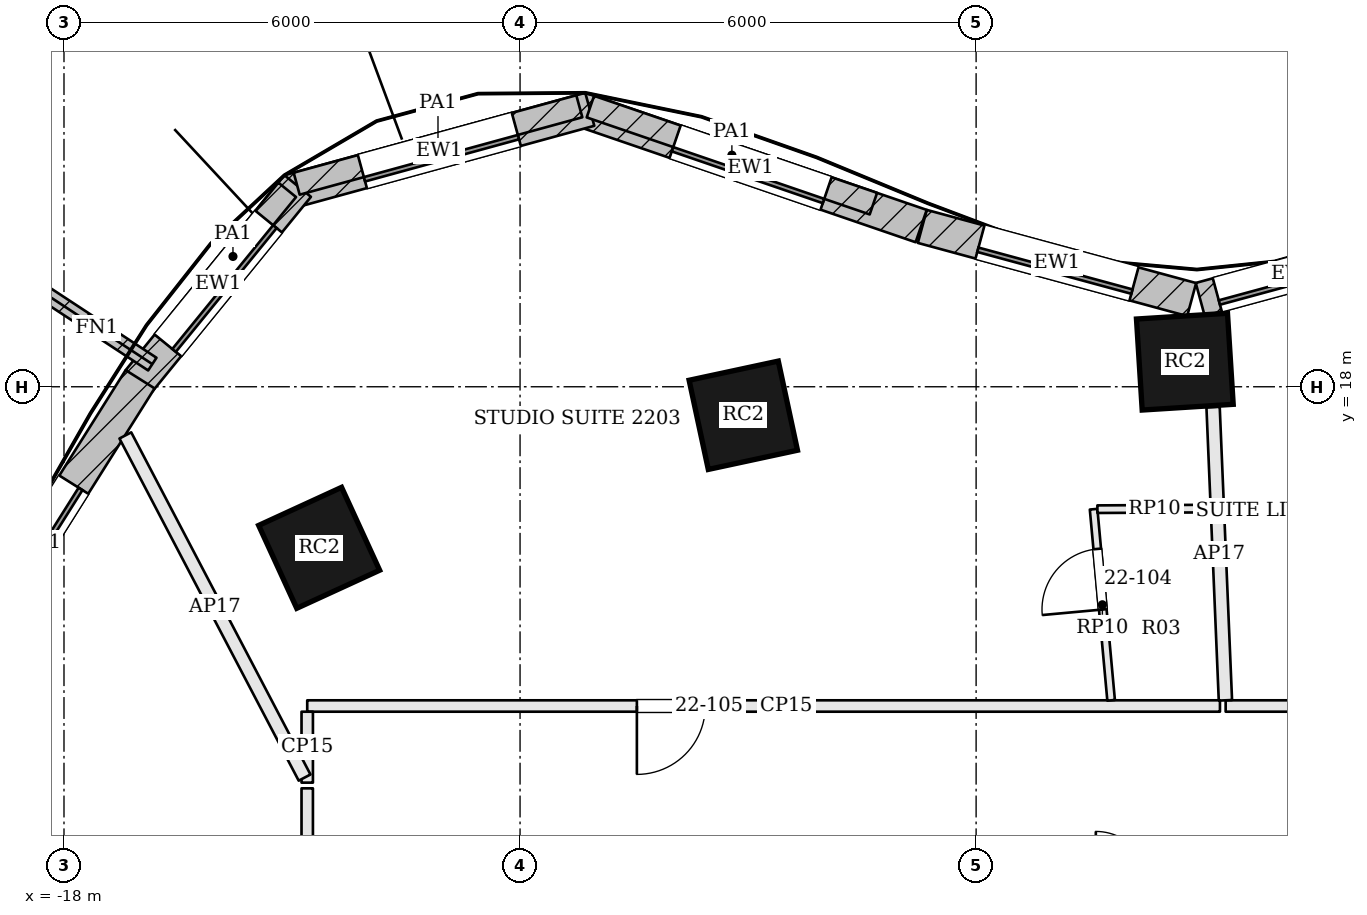
"""IFC4 building model, lengths in metres.
Left out: names, types, materials, properties, quantities, classifications, styles, units other than length and angle.
Written with IfcOpenShell. Run it as: python <this file> out.ifc"""

import sys

from ifc_helpers import new_model, si_unit, direction, frame, frame_2d, origin, origin_2d, place, context, subcontext, project, spatial, rectangle, extrude, element, fill, save


model = new_model("IFC4")
c1 = context("Model", 3, precision=1e-05, world=origin(), true_north=direction((0.0, 1.0)))
c2 = subcontext(c1, "Body", "Model", "MODEL_VIEW")
j1 = project(units=[si_unit("LENGTHUNIT", "METRE"), si_unit("PLANEANGLEUNIT", "RADIAN")], contexts=[c1])
p1 = place(None, origin())
s1 = spatial("IfcSite", under=j1, at=p1, CompositionType="ELEMENT")
p2 = place(p1, origin())
s2 = spatial("IfcBuilding", under=s1, at=p2, CompositionType="ELEMENT")
p3 = place(p2, frame((0.0, 0.0, 96.0)))
s3 = spatial("IfcBuildingStorey", under=s2, at=p3, CompositionType="ELEMENT", Elevation=96.0)
for number, where, z_axis, x_axis in (
    (1, (-3.254, 18.33, 0.0), (0.0, 0.0, 1.0), (-0.998, -0.063, 0.0)),
    (2, (-9.063, 17.625, 0.0), (0.0, 0.0, 1.0), (-0.978, -0.21, 0.0)),
    (3, (-14.643, 15.881, 0.0), (0.0, 0.0, 1.0), (-0.909, -0.417, 0.0)),
):
    element("IfcColumn", number, at=place(p3, frame(where, z_axis=z_axis, x_axis=x_axis)), inside=s3, PredefinedType="COLUMN", context=c2, shape_type="SweptSolid", body=[
        extrude(rectangle(XDim=1.2, YDim=1.2, at=origin_2d()), origin(), (0.0, 0.0, 1.0), 3.6),
    ])
p4 = place(p3, frame((-0.576, 19.821, 0.0), z_axis=(0.0, 0.0, 1.0), x_axis=(-0.965009398019, -0.262215296532, 0.0)))
e4 = element("IfcWall", 4, at=p4, inside=s3, PredefinedType="SOLIDWALL", context=c2, shape_type="SweptSolid", body=[
    extrude(rectangle(XDim=2.565, YDim=0.45, at=frame_2d((1.283, 0.0))), origin(), (0.0, 0.0, 1.0), 3.4),
])
p5 = place(p4, frame((0.233, 0.0, 0.9)))
e5 = element("IfcOpeningElement", 5, at=p5, cuts=e4, PredefinedType="OPENING", context=c2, shape_type="SweptSolid", body=[
    extrude(rectangle(XDim=2.1, YDim=2.0, at=frame_2d((1.05, 1.0))), frame((0.0, 0.235, 0.0), z_axis=(0.0, -1.0, 0.0), x_axis=(1.0, 0.0, 0.0)), (0.0, 0.0, 1.0), 0.47),
])
p6 = place(p3, frame((-3.164, 19.147, 0.0), z_axis=(0.0, 0.0, 1.0), x_axis=(-0.965039479998, 0.262104563191, 0.0)))
e6 = element("IfcWall", 6, at=p6, inside=s3, PredefinedType="SOLIDWALL", context=c2, shape_type="SweptSolid", body=[
    extrude(rectangle(XDim=3.672, YDim=0.45, at=frame_2d((1.836, 0.0))), origin(), (0.0, 0.0, 1.0), 3.4),
])
p7 = place(p6, frame((0.786, 0.0, 0.9)))
e7 = element("IfcOpeningElement", 7, at=p7, cuts=e6, PredefinedType="OPENING", context=c2, shape_type="SweptSolid", body=[
    extrude(rectangle(XDim=2.1, YDim=2.0, at=frame_2d((1.05, 1.0))), frame((0.0, 0.235, 0.0), z_axis=(0.0, -1.0, 0.0), x_axis=(1.0, 0.0, 0.0)), (0.0, 0.0, 1.0), 0.47),
])
p8 = place(p3, frame((-6.723, 20.114, 0.0), z_axis=(0.0, 0.0, 1.0), x_axis=(-0.945947299026, 0.324320377815, 0.0)))
e8 = element("IfcWall", 8, at=p8, inside=s3, PredefinedType="SOLIDWALL", context=c2, shape_type="SweptSolid", body=[
    extrude(rectangle(XDim=4.745, YDim=0.45, at=frame_2d((2.372, 0.0))), origin(), (0.0, 0.0, 1.0), 3.4),
])
p9 = place(p8, frame((1.322, 0.0, 0.9)))
e9 = element("IfcOpeningElement", 9, at=p9, cuts=e8, PredefinedType="OPENING", context=c2, shape_type="SweptSolid", body=[
    extrude(rectangle(XDim=2.1, YDim=2.0, at=frame_2d((1.05, 1.0))), frame((0.0, 0.235, 0.0), z_axis=(0.0, -1.0, 0.0), x_axis=(1.0, 0.0, 0.0)), (0.0, 0.0, 1.0), 0.47),
])
p10 = place(p3, frame((-11.083, 21.65, 0.0), z_axis=(0.0, 0.0, 1.0), x_axis=(-0.964483204983, -0.264144179011, 0.0)))
e10 = element("IfcWall", 10, at=p10, inside=s3, PredefinedType="SOLIDWALL", context=c2, shape_type="SweptSolid", body=[
    extrude(rectangle(XDim=4.104, YDim=0.45, at=frame_2d((2.052, 0.0))), origin(), (0.0, 0.0, 1.0), 3.4),
])
p11 = place(p10, frame((1.002, 0.0, 0.9)))
e11 = element("IfcOpeningElement", 11, at=p11, cuts=e10, PredefinedType="OPENING", context=c2, shape_type="SweptSolid", body=[
    extrude(rectangle(XDim=2.1, YDim=2.0, at=frame_2d((1.05, 1.0))), frame((0.0, 0.235, 0.0), z_axis=(0.0, -1.0, 0.0), x_axis=(1.0, 0.0, 0.0)), (0.0, 0.0, 1.0), 0.47),
])
p12 = place(p3, frame((-14.926, 20.641, 0.0), z_axis=(0.0, 0.0, 1.0), x_axis=(-0.631548074669, -0.775336720001, 0.0)))
e12 = element("IfcWall", 12, at=p12, inside=s3, PredefinedType="SOLIDWALL", context=c2, shape_type="SweptSolid", body=[
    extrude(rectangle(XDim=3.308, YDim=0.45, at=frame_2d((1.654, 0.0))), origin(), (0.0, 0.0, 1.0), 3.4),
])
p13 = place(p12, frame((0.604, 0.0, 0.9)))
e13 = element("IfcOpeningElement", 13, at=p13, cuts=e12, PredefinedType="OPENING", context=c2, shape_type="SweptSolid", body=[
    extrude(rectangle(XDim=2.1, YDim=2.0, at=frame_2d((1.05, 1.0))), frame((0.0, 0.235, 0.0), z_axis=(0.0, -1.0, 0.0), x_axis=(1.0, 0.0, 0.0)), (0.0, 0.0, 1.0), 0.47),
])
p14 = place(p3, frame((-16.998, 18.099, 0.0), z_axis=(0.0, 0.0, 1.0), x_axis=(-0.532745661304, -0.846275404559, 0.0)))
e14 = element("IfcWall", 14, at=p14, inside=s3, PredefinedType="SOLIDWALL", context=c2, shape_type="SweptSolid", body=[
    extrude(rectangle(XDim=5.076, YDim=0.45, at=frame_2d((2.538, 0.0))), origin(), (0.0, 0.0, 1.0), 3.4),
])
p15 = place(p14, frame((1.638, 0.0, 0.9)))
e15 = element("IfcOpeningElement", 15, at=p15, cuts=e14, PredefinedType="OPENING", context=c2, shape_type="SweptSolid", body=[
    extrude(rectangle(XDim=1.8, YDim=2.0, at=frame_2d((0.9, 1.0))), frame((0.0, 0.235, 0.0), z_axis=(0.0, -1.0, 0.0), x_axis=(1.0, 0.0, 0.0)), (0.0, 0.0, 1.0), 0.47),
])
p16 = place(p3, frame((-16.838, 18.298, 0.0), z_axis=(0.0, 0.0, 1.0), x_axis=(-0.835871900419, 0.548924554097, 0.0)))
e16 = element("IfcWall", 16, at=p16, inside=s3, PredefinedType="SOLIDWALL", context=c2, shape_type="SweptSolid", body=[
    extrude(rectangle(XDim=1.75, YDim=0.2, at=frame_2d((0.875, 0.0))), origin(), (0.0, 0.0, 1.0), 3.4),
])
p17 = place(p3, frame((-7.352, 20.409, 3.6), z_axis=(0.0, 0.0, 1.0), x_axis=(-0.945937789937, 0.32434811171, 0.0)))
e17 = element("IfcWall", 17, at=p17, inside=s3, PredefinedType="PARAPET", context=c2, shape_type="SweptSolid", body=[
    extrude(rectangle(XDim=3.936, YDim=0.3, at=frame_2d((1.968, 0.0))), origin(), (0.0, 0.0, 1.0), 1.1),
])
p18 = place(p3, frame((-11.22, 21.69, 3.6), z_axis=(0.0, 0.0, 1.0), x_axis=(-0.964484148392, -0.264140734271, 0.0)))
e18 = element("IfcWall", 18, at=p18, inside=s3, PredefinedType="PARAPET", context=c2, shape_type="SweptSolid", body=[
    extrude(rectangle(XDim=3.855, YDim=0.3, at=frame_2d((1.928, 0.0))), origin(), (0.0, 0.0, 1.0), 1.1),
])
p19 = place(p3, frame((-15.063, 20.591, 3.6), z_axis=(0.0, 0.0, 1.0), x_axis=(-0.631559943447, -0.775327052174, 0.0)))
e19 = element("IfcWall", 19, at=p19, inside=s3, PredefinedType="PARAPET", context=c2, shape_type="SweptSolid", body=[
    extrude(rectangle(XDim=2.26, YDim=0.3, at=frame_2d((1.13, 0.0))), origin(), (0.0, 0.0, 1.0), 1.1),
])
p20 = place(p3, frame((8.911, 13.8, 0.0), z_axis=(0.0, 0.0, 1.0), x_axis=(-1.0, 0.0, 0.0)))
e20 = element("IfcWall", 20, at=p20, inside=s3, PredefinedType="PARTITIONING", context=c2, shape_type="SweptSolid", body=[
    extrude(rectangle(XDim=11.628, YDim=0.15, at=frame_2d((5.814, 0.0))), origin(), (0.0, 0.0, 1.0), 2.784),
])
p21 = place(p20, frame((9.669, 0.0, 0.0)))
e21 = element("IfcOpeningElement", 21, at=p21, cuts=e20, PredefinedType="OPENING", context=c2, shape_type="SweptSolid", body=[
    extrude(rectangle(XDim=1.0, YDim=2.1, at=frame_2d((0.5, 1.05))), frame((0.0, 0.085, 0.0), z_axis=(0.0, -1.0, 0.0), x_axis=(1.0, 0.0, 0.0)), (0.0, 0.0, 1.0), 0.17),
])
p22 = place(p3, frame((-2.882, 17.732, 0.0), z_axis=(0.0, 0.0, 1.0), x_axis=(0.04199090748, -0.999117992876, 0.0)))
e22 = element("IfcWall", 22, at=p22, inside=s3, PredefinedType="PARTITIONING", context=c2, shape_type="SweptSolid", body=[
    extrude(rectangle(XDim=3.861, YDim=0.175, at=frame_2d((1.93, 0.0))), origin(), (0.0, 0.0, 1.0), 2.784),
])
p23 = place(p3, frame((-2.792, 13.8, 0.0), z_axis=(0.0, 0.0, 1.0), x_axis=(-1.0, 0.0, 0.0)))
e23 = element("IfcWall", 23, at=p23, inside=s3, PredefinedType="PARTITIONING", context=c2, shape_type="SweptSolid", body=[
    extrude(rectangle(XDim=12.008, YDim=0.15, at=frame_2d((6.004, 0.0))), origin(), (0.0, 0.0, 1.0), 2.784),
])
p24 = place(p23, frame((6.771, 0.0, 0.0)))
e24 = element("IfcOpeningElement", 24, at=p24, cuts=e23, PredefinedType="OPENING", context=c2, shape_type="SweptSolid", body=[
    extrude(rectangle(XDim=0.9, YDim=2.4, at=frame_2d((0.45, 1.2))), frame((0.0, 0.085, 0.0), z_axis=(0.0, -1.0, 0.0), x_axis=(1.0, 0.0, 0.0)), (0.0, 0.0, 1.0), 0.17),
])
p25 = place(p3, frame((-14.8, 13.725, 0.0), z_axis=(0.0, 0.0, 1.0), x_axis=(0.0, -1.0, 0.0)))
e25 = element("IfcWall", 25, at=p25, inside=s3, PredefinedType="PARTITIONING", context=c2, shape_type="SweptSolid", body=[
    extrude(rectangle(XDim=0.933, YDim=0.15, at=frame_2d((0.467, 0.0))), origin(), (0.0, 0.0, 1.0), 2.784),
])
p26 = place(p3, frame((-17.193, 17.36, 0.0), z_axis=(0.0, 0.0, 1.0), x_axis=(0.46402494572, -0.885822132118, 0.0)))
e26 = element("IfcWall", 26, at=p26, inside=s3, PredefinedType="PARTITIONING", context=c2, shape_type="SweptSolid", body=[
    extrude(rectangle(XDim=5.082, YDim=0.175, at=frame_2d((2.541, 0.0))), origin(), (0.0, 0.0, 1.0), 2.784),
])
p27 = place(p3, frame((-14.8, 12.717, 0.0), z_axis=(0.0, 0.0, 1.0), x_axis=(0.0, -1.0, 0.0)))
e27 = element("IfcWall", 27, at=p27, inside=s3, PredefinedType="PARTITIONING", context=c2, shape_type="SweptSolid", body=[
    extrude(rectangle(XDim=2.22, YDim=0.15, at=frame_2d((1.11, 0.0))), origin(), (0.0, 0.0, 1.0), 2.784),
])
p28 = place(p3, frame((-4.224, 13.875, 0.0), z_axis=(0.0, 0.0, 1.0), x_axis=(-0.09127675815, 0.995825563752, 0.0)))
e28 = element("IfcWall", 28, at=p28, inside=s3, PredefinedType="PARTITIONING", context=c2, shape_type="SweptSolid", body=[
    extrude(rectangle(XDim=2.525, YDim=0.1, at=frame_2d((1.262, 0.0))), origin(), (0.0, 0.0, 1.0), 2.884),
])
p29 = place(p28, frame((1.2, 0.0, 0.0)))
e29 = element("IfcOpeningElement", 29, at=p29, cuts=e28, PredefinedType="OPENING", context=c2, shape_type="SweptSolid", body=[
    extrude(rectangle(XDim=0.8, YDim=2.1, at=frame_2d((0.4, 1.05))), frame((0.0, 0.06, 0.0), z_axis=(0.0, -1.0, 0.0), x_axis=(1.0, 0.0, 0.0)), (0.0, 0.0, 1.0), 0.12),
])
p30 = place(p3, frame((-4.404, 16.389, 0.0), z_axis=(0.0, 0.0, 1.0), x_axis=(0.999986489733, 0.005198110408, 0.0)))
e30 = element("IfcWall", 30, at=p30, inside=s3, PredefinedType="PARTITIONING", context=c2, shape_type="SweptSolid", body=[
    extrude(rectangle(XDim=1.503, YDim=0.1, at=frame_2d((0.751, 0.0))), origin(), (0.0, 0.0, 1.0), 2.884),
])
p31 = place(p5, origin())
e31 = element("IfcWindow", 31, at=p31, inside=s3, PartitioningType="SINGLE_PANEL", PredefinedType="WINDOW", context=c2, shape_type="SweptSolid", body=[
    extrude(rectangle(XDim=2.1, YDim=2.0, at=frame_2d((1.05, 1.0))), frame((0.0, 0.135, 0.0), z_axis=(0.0, -1.0, 0.0), x_axis=(1.0, 0.0, 0.0)), (0.0, 0.0, 1.0), 0.06),
])
fill(e5, e31)
p32 = place(p7, origin())
e32 = element("IfcWindow", 32, at=p32, inside=s3, PartitioningType="SINGLE_PANEL", PredefinedType="WINDOW", context=c2, shape_type="SweptSolid", body=[
    extrude(rectangle(XDim=2.1, YDim=2.0, at=frame_2d((1.05, 1.0))), frame((0.0, 0.135, 0.0), z_axis=(0.0, -1.0, 0.0), x_axis=(1.0, 0.0, 0.0)), (0.0, 0.0, 1.0), 0.06),
])
fill(e7, e32)
p33 = place(p9, origin())
e33 = element("IfcWindow", 33, at=p33, inside=s3, PartitioningType="SINGLE_PANEL", PredefinedType="WINDOW", context=c2, shape_type="SweptSolid", body=[
    extrude(rectangle(XDim=2.1, YDim=2.0, at=frame_2d((1.05, 1.0))), frame((0.0, 0.135, 0.0), z_axis=(0.0, -1.0, 0.0), x_axis=(1.0, 0.0, 0.0)), (0.0, 0.0, 1.0), 0.06),
])
fill(e9, e33)
p34 = place(p11, origin())
e34 = element("IfcWindow", 34, at=p34, inside=s3, PartitioningType="SINGLE_PANEL", PredefinedType="WINDOW", context=c2, shape_type="SweptSolid", body=[
    extrude(rectangle(XDim=2.1, YDim=2.0, at=frame_2d((1.05, 1.0))), frame((0.0, 0.135, 0.0), z_axis=(0.0, -1.0, 0.0), x_axis=(1.0, 0.0, 0.0)), (0.0, 0.0, 1.0), 0.06),
])
fill(e11, e34)
p35 = place(p13, origin())
e35 = element("IfcWindow", 35, at=p35, inside=s3, PartitioningType="SINGLE_PANEL", PredefinedType="WINDOW", context=c2, shape_type="SweptSolid", body=[
    extrude(rectangle(XDim=2.1, YDim=2.0, at=frame_2d((1.05, 1.0))), frame((0.0, 0.135, 0.0), z_axis=(0.0, -1.0, 0.0), x_axis=(1.0, 0.0, 0.0)), (0.0, 0.0, 1.0), 0.06),
])
fill(e13, e35)
p36 = place(p15, origin())
e36 = element("IfcWindow", 36, at=p36, inside=s3, PartitioningType="SINGLE_PANEL", PredefinedType="WINDOW", context=c2, shape_type="SweptSolid", body=[
    extrude(rectangle(XDim=1.8, YDim=2.0, at=frame_2d((0.9, 1.0))), frame((0.0, 0.135, 0.0), z_axis=(0.0, -1.0, 0.0), x_axis=(1.0, 0.0, 0.0)), (0.0, 0.0, 1.0), 0.06),
])
fill(e15, e36)
p37 = place(p29, origin())
e37 = element("IfcDoor", 37, at=p37, inside=s3, OperationType="SINGLE_SWING_LEFT", PredefinedType="DOOR", context=c2, shape_type="SweptSolid", body=[
    extrude(rectangle(XDim=0.8, YDim=2.1, at=frame_2d((0.4, 1.05))), frame((0.0, 0.025, 0.0), z_axis=(0.0, -1.0, 0.0), x_axis=(1.0, 0.0, 0.0)), (0.0, 0.0, 1.0), 0.05),
])
fill(e29, e37)
p38 = place(p24, origin())
e38 = element("IfcDoor", 38, at=p38, inside=s3, OperationType="SINGLE_SWING_RIGHT", PredefinedType="DOOR", context=c2, shape_type="SweptSolid", body=[
    extrude(rectangle(XDim=0.9, YDim=2.4, at=frame_2d((0.45, 1.2))), frame((0.0, 0.025, 0.0), z_axis=(0.0, -1.0, 0.0), x_axis=(1.0, 0.0, 0.0)), (0.0, 0.0, 1.0), 0.05),
])
fill(e24, e38)
save(model, sys.argv[1])
